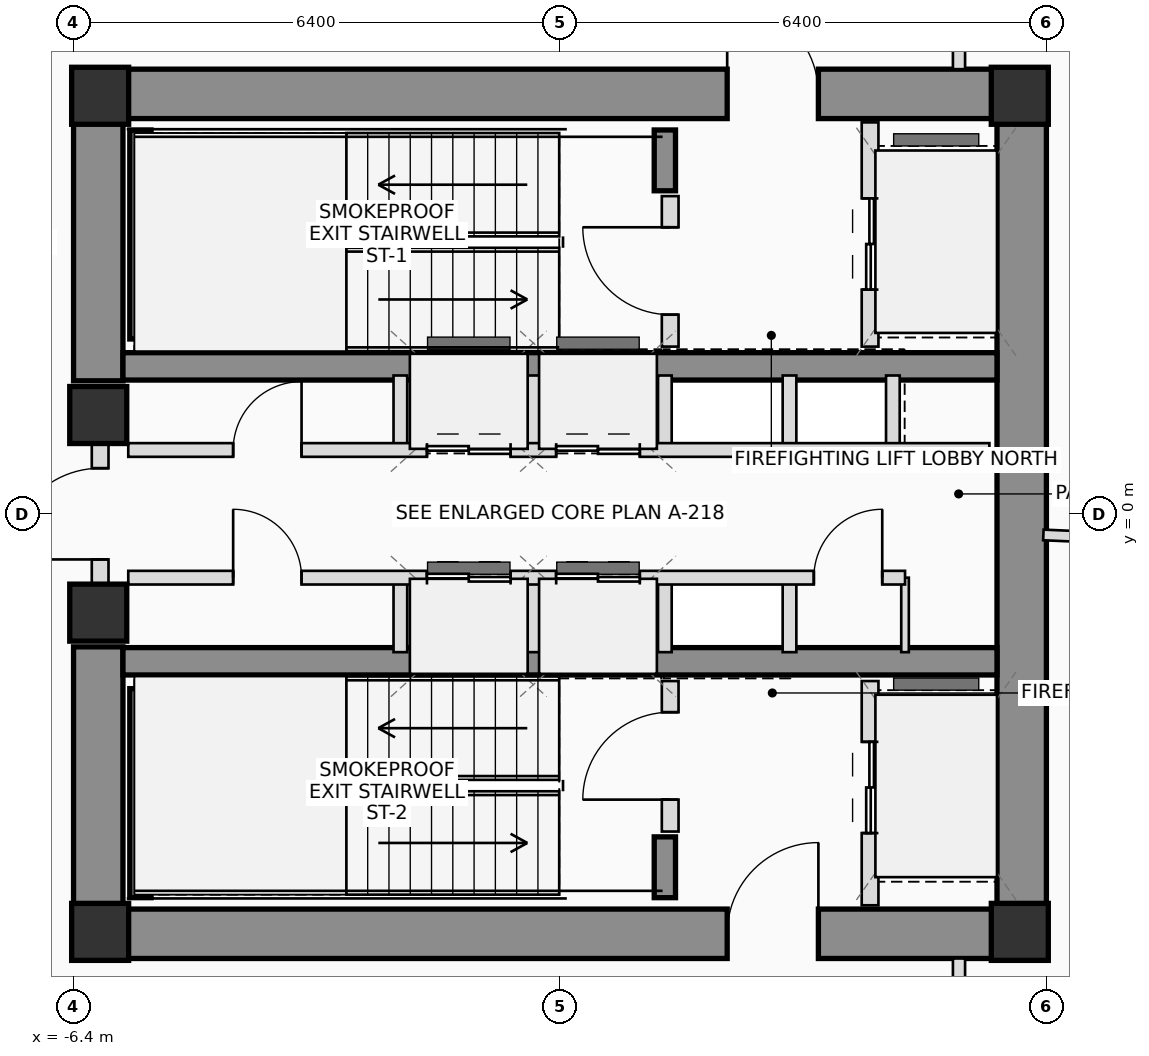
"""IFC4 building model, lengths in metres.
Left out: names, types, materials, properties, quantities, classifications, styles, units other than length and angle.
Written with IfcOpenShell. Run it as: python <this file> out.ifc"""

import sys

from ifc_helpers import new_model, si_unit, direction, frame, frame_2d, origin, origin_2d, place, context, subcontext, project, spatial, rectangle, extrude, source, transform, mapped, element, fill, save


model = new_model("IFC4")
c1 = context("Model", 3, precision=1e-05, world=origin(), true_north=direction((0.0, 1.0)))
c2 = subcontext(c1, "Body", "Model", "MODEL_VIEW")
j1 = project(units=[si_unit("LENGTHUNIT", "METRE"), si_unit("PLANEANGLEUNIT", "RADIAN")], contexts=[c1])
p1 = place(None, origin())
s1 = spatial("IfcSite", under=j1, at=p1, CompositionType="ELEMENT")
p2 = place(p1, origin())
s2 = spatial("IfcBuilding", under=s1, at=p2, CompositionType="ELEMENT")
p3 = place(p2, frame((0.0, 0.0, 198.35)))
s3 = spatial("IfcBuildingStorey", under=s2, at=p3, CompositionType="ELEMENT", Elevation=198.35)
m1 = source(origin(), c2, "Body", "SweptSolid", [
    extrude(rectangle(XDim=0.75, YDim=0.75, at=origin_2d()), origin(), (0.0, 0.0, 1.0), 3.45),
])
for number, where, z_axis, x_axis in (
    (1, (-6.05, -5.5, 0.0), (0.0, 0.0, 1.0), (1.0, 0.0, 0.0)),
    (2, (6.05, -5.5, 0.0), (0.0, 0.0, 1.0), (1.0, 0.0, 0.0)),
    (3, (6.05, 5.5, 0.0), (0.0, 0.0, 1.0), (1.0, 0.0, 0.0)),
    (4, (-6.05, 5.5, 0.0), (0.0, 0.0, 1.0), (1.0, 0.0, 0.0)),
):
    element("IfcColumn", number, at=place(p3, frame(where, z_axis=z_axis, x_axis=x_axis)), inside=s3, PredefinedType="COLUMN", context=c2, shape_type="MappedRepresentation", body=[
        mapped(m1, transform((0.0, 0.0, 0.0), scale=1.0)),
    ])
p4 = place(p3, frame((-6.4, 5.525, 0.0), z_axis=(0.0, 0.0, 1.0), x_axis=(1.0, 0.0, 0.0)))
e5 = element("IfcWall", 5, at=p4, inside=s3, PredefinedType="SHEAR", context=c2, shape_type="SweptSolid", body=[
    extrude(rectangle(XDim=12.8, YDim=0.65, at=frame_2d((6.4, 0.0))), origin(), (0.0, 0.0, 1.0), 3.45),
])
p5 = place(p4, frame((8.6, 0.0, 0.0)))
e6 = element("IfcOpeningElement", 6, at=p5, cuts=e5, PredefinedType="OPENING", context=c2, shape_type="SweptSolid", body=[
    extrude(rectangle(XDim=1.2, YDim=2.2, at=frame_2d((0.6, 1.1))), frame((0.0, 0.335, 0.0), z_axis=(0.0, -1.0, 0.0), x_axis=(1.0, 0.0, 0.0)), (0.0, 0.0, 1.0), 0.67),
])
p6 = place(p3, frame((-6.4, -5.525, 0.0), z_axis=(0.0, 0.0, 1.0), x_axis=(1.0, 0.0, 0.0)))
e7 = element("IfcWall", 7, at=p6, inside=s3, PredefinedType="SHEAR", context=c2, shape_type="SweptSolid", body=[
    extrude(rectangle(XDim=12.8, YDim=0.65, at=frame_2d((6.4, 0.0))), origin(), (0.0, 0.0, 1.0), 3.45),
])
p7 = place(p6, frame((8.6, 0.0, 0.0)))
e8 = element("IfcOpeningElement", 8, at=p7, cuts=e7, PredefinedType="OPENING", context=c2, shape_type="SweptSolid", body=[
    extrude(rectangle(XDim=1.2, YDim=2.2, at=frame_2d((0.6, 1.1))), frame((0.0, 0.335, 0.0), z_axis=(0.0, -1.0, 0.0), x_axis=(1.0, 0.0, 0.0)), (0.0, 0.0, 1.0), 0.67),
])
p8 = place(p3, frame((6.075, -5.2, 0.0), z_axis=(0.0, 0.0, 1.0), x_axis=(0.0, 1.0, 0.0)))
e9 = element("IfcWall", 9, at=p8, inside=s3, PredefinedType="SHEAR", context=c2, shape_type="SweptSolid", body=[
    extrude(rectangle(XDim=10.4, YDim=0.65, at=frame_2d((5.2, 0.0))), origin(), (0.0, 0.0, 1.0), 3.45),
])
for number, where, z_axis, x_axis in (
    (10, (-6.075, -5.2, 0.0), (0.0, 0.0, 1.0), (0.0, 1.0, 0.0)),
    (11, (-6.075, 1.75, 0.0), (0.0, 0.0, 1.0), (0.0, 1.0, 0.0)),
):
    element("IfcWall", number, at=place(p3, frame(where, z_axis=z_axis, x_axis=x_axis)), inside=s3, PredefinedType="SHEAR", context=c2, shape_type="SweptSolid", body=[
        extrude(rectangle(XDim=3.45, YDim=0.65, at=frame_2d((1.725, 0.0))), origin(), (0.0, 0.0, 1.0), 3.45),
    ])
for number, where, z_axis, x_axis in (
    (12, (-5.75, 1.94, 0.0), (0.0, 0.0, 1.0), (1.0, 0.0, 0.0)),
    (13, (-5.75, -1.94, 0.0), (0.0, 0.0, 1.0), (1.0, 0.0, 0.0)),
):
    element("IfcWall", number, at=place(p3, frame(where, z_axis=z_axis, x_axis=x_axis)), inside=s3, PredefinedType="SHEAR", context=c2, shape_type="SweptSolid", body=[
        extrude(rectangle(XDim=11.5, YDim=0.36, at=frame_2d((5.75, 0.0))), origin(), (0.0, 0.0, 1.0), 3.45),
    ])
p9 = place(p3, frame((-5.52, 2.3, 0.0), z_axis=(0.0, 0.0, 1.0), x_axis=(0.0, 1.0, 0.0)))
e14 = element("IfcWall", 14, at=p9, inside=s3, PredefinedType="SHEAR", context=c2, shape_type="SweptSolid", body=[
    extrude(rectangle(XDim=2.75, YDim=0.28, at=frame_2d((1.375, 0.0))), origin(), (0.0, 0.0, 1.0), 3.45),
])
p10 = place(p3, frame((1.38, 4.25, 0.0), z_axis=(0.0, 0.0, 1.0), x_axis=(0.0, 1.0, 0.0)))
e15 = element("IfcWall", 15, at=p10, inside=s3, PredefinedType="SHEAR", context=c2, shape_type="SweptSolid", body=[
    extrude(rectangle(XDim=0.8, YDim=0.28, at=frame_2d((0.4, 0.0))), origin(), (0.0, 0.0, 1.0), 3.45),
])
p11 = place(p3, frame((-5.52, -5.05, 0.0), z_axis=(0.0, 0.0, 1.0), x_axis=(0.0, 1.0, 0.0)))
e16 = element("IfcWall", 16, at=p11, inside=s3, PredefinedType="SHEAR", context=c2, shape_type="SweptSolid", body=[
    extrude(rectangle(XDim=2.75, YDim=0.28, at=frame_2d((1.375, 0.0))), origin(), (0.0, 0.0, 1.0), 3.45),
])
p12 = place(p3, frame((1.38, -5.05, 0.0), z_axis=(0.0, 0.0, 1.0), x_axis=(0.0, 1.0, 0.0)))
e17 = element("IfcWall", 17, at=p12, inside=s3, PredefinedType="SHEAR", context=c2, shape_type="SweptSolid", body=[
    extrude(rectangle(XDim=0.8, YDim=0.28, at=frame_2d((0.4, 0.0))), origin(), (0.0, 0.0, 1.0), 3.45),
])
for number, where, z_axis, x_axis in (
    (18, (-6.075, -1.3, 0.0), (0.0, 0.0, 1.0), (1.0, 0.0, 0.0)),
    (19, (-6.075, 1.3, 0.0), (0.0, 0.0, 1.0), (1.0, 0.0, 0.0)),
):
    element("IfcColumn", number, at=place(p3, frame(where, z_axis=z_axis, x_axis=x_axis)), inside=s3, PredefinedType="COLUMN", context=c2, shape_type="MappedRepresentation", body=[
        mapped(m1, transform((0.0, 0.0, 0.0), scale=1.0)),
    ])
p13 = place(p3, frame((-6.05, -0.95, 0.0), z_axis=(0.0, 0.0, 1.0), x_axis=(0.0, 1.0, 0.0)))
e20 = element("IfcWall", 20, at=p13, inside=s3, PredefinedType="PLUMBINGWALL", context=c2, shape_type="SweptSolid", body=[
    extrude(rectangle(XDim=1.9, YDim=0.22, at=frame_2d((0.95, 0.0))), origin(), (0.0, 0.0, 1.0), 2.23),
])
p14 = place(p13, frame((0.35, 0.0, 0.0)))
e21 = element("IfcOpeningElement", 21, at=p14, cuts=e20, PredefinedType="OPENING", context=c2, shape_type="SweptSolid", body=[
    extrude(rectangle(XDim=1.2, YDim=2.2, at=frame_2d((0.6, 1.1))), frame((0.0, 0.12, 0.0), z_axis=(0.0, -1.0, 0.0), x_axis=(1.0, 0.0, 0.0)), (0.0, 0.0, 1.0), 0.24),
])
p15 = place(p3, frame((1.45, 2.2, 0.0), z_axis=(0.0, 0.0, 1.0), x_axis=(0.0, 1.0, 0.0)))
e22 = element("IfcWall", 22, at=p15, inside=s3, PredefinedType="PLUMBINGWALL", context=c2, shape_type="SweptSolid", body=[
    extrude(rectangle(XDim=1.98, YDim=0.22, at=frame_2d((0.99, 0.0))), origin(), (0.0, 0.0, 1.0), 3.25),
])
p16 = place(p15, frame((0.42, 0.0, 0.0)))
e23 = element("IfcOpeningElement", 23, at=p16, cuts=e22, PredefinedType="OPENING", context=c2, shape_type="SweptSolid", body=[
    extrude(rectangle(XDim=1.15, YDim=2.15, at=frame_2d((0.575, 1.075))), frame((0.0, 0.12, 0.0), z_axis=(0.0, -1.0, 0.0), x_axis=(1.0, 0.0, 0.0)), (0.0, 0.0, 1.0), 0.24),
])
p17 = place(p3, frame((4.08, 2.2, 0.0), z_axis=(0.0, 0.0, 1.0), x_axis=(0.0, 1.0, 0.0)))
e24 = element("IfcWall", 24, at=p17, inside=s3, PredefinedType="PLUMBINGWALL", context=c2, shape_type="SweptSolid", body=[
    extrude(rectangle(XDim=2.95, YDim=0.22, at=frame_2d((1.475, 0.0))), origin(), (0.0, 0.0, 1.0), 3.25),
])
p18 = place(p17, frame((0.75, 0.0, 0.0)))
e25 = element("IfcOpeningElement", 25, at=p18, cuts=e24, PredefinedType="OPENING", context=c2, shape_type="SweptSolid", body=[
    extrude(rectangle(XDim=1.2, YDim=2.25, at=frame_2d((0.6, 1.125))), frame((0.0, 0.12, 0.0), z_axis=(0.0, -1.0, 0.0), x_axis=(1.0, 0.0, 0.0)), (0.0, 0.0, 1.0), 0.24),
])
p19 = place(p3, frame((1.45, -4.18, 0.0), z_axis=(0.0, 0.0, 1.0), x_axis=(0.0, 1.0, 0.0)))
e26 = element("IfcWall", 26, at=p19, inside=s3, PredefinedType="PLUMBINGWALL", context=c2, shape_type="SweptSolid", body=[
    extrude(rectangle(XDim=1.98, YDim=0.22, at=frame_2d((0.99, 0.0))), origin(), (0.0, 0.0, 1.0), 3.25),
])
p20 = place(p19, frame((0.42, 0.0, 0.0)))
e27 = element("IfcOpeningElement", 27, at=p20, cuts=e26, PredefinedType="OPENING", context=c2, shape_type="SweptSolid", body=[
    extrude(rectangle(XDim=1.15, YDim=2.15, at=frame_2d((0.575, 1.075))), frame((0.0, 0.12, 0.0), z_axis=(0.0, -1.0, 0.0), x_axis=(1.0, 0.0, 0.0)), (0.0, 0.0, 1.0), 0.24),
])
p21 = place(p3, frame((4.08, -5.15, 0.0), z_axis=(0.0, 0.0, 1.0), x_axis=(0.0, 1.0, 0.0)))
e28 = element("IfcWall", 28, at=p21, inside=s3, PredefinedType="PLUMBINGWALL", context=c2, shape_type="SweptSolid", body=[
    extrude(rectangle(XDim=2.95, YDim=0.22, at=frame_2d((1.475, 0.0))), origin(), (0.0, 0.0, 1.0), 3.25),
])
p22 = place(p21, frame((0.95, 0.0, 0.0)))
e29 = element("IfcOpeningElement", 29, at=p22, cuts=e28, PredefinedType="OPENING", context=c2, shape_type="SweptSolid", body=[
    extrude(rectangle(XDim=1.2, YDim=2.25, at=frame_2d((0.6, 1.125))), frame((0.0, 0.12, 0.0), z_axis=(0.0, -1.0, 0.0), x_axis=(1.0, 0.0, 0.0)), (0.0, 0.0, 1.0), 0.24),
])
for number, where, z_axis, x_axis in (
    (30, (-2.1, 0.84, 0.0), (0.0, 0.0, 1.0), (0.0, 1.0, 0.0)),
    (31, (-2.1, -1.82, 0.0), (0.0, 0.0, 1.0), (0.0, 1.0, 0.0)),
    (32, (-0.35, 0.84, 0.0), (0.0, 0.0, 1.0), (0.0, 1.0, 0.0)),
    (33, (-0.35, -1.82, 0.0), (0.0, 0.0, 1.0), (0.0, 1.0, 0.0)),
    (34, (1.38, 0.84, 0.0), (0.0, 0.0, 1.0), (0.0, 1.0, 0.0)),
    (35, (1.38, -1.82, 0.0), (0.0, 0.0, 1.0), (0.0, 1.0, 0.0)),
    (36, (3.02, 0.84, 0.0), (0.0, 0.0, 1.0), (0.0, 1.0, 0.0)),
    (37, (4.38, 0.84, 0.0), (0.0, 0.0, 1.0), (0.0, 1.0, 0.0)),
    (38, (3.02, -1.82, 0.0), (0.0, 0.0, 1.0), (0.0, 1.0, 0.0)),
):
    element("IfcWall", number, at=place(p3, frame(where, z_axis=z_axis, x_axis=x_axis)), inside=s3, PredefinedType="PLUMBINGWALL", context=c2, shape_type="SweptSolid", body=[
        extrude(rectangle(XDim=0.98, YDim=0.18, at=frame_2d((0.49, 0.0))), origin(), (0.0, 0.0, 1.0), 3.25),
    ])
p23 = place(p3, frame((4.54, -1.82, 0.0), z_axis=(0.0, 0.0, 1.0), x_axis=(0.0, 1.0, 0.0)))
e39 = element("IfcWall", 39, at=p23, inside=s3, PredefinedType="PARTITIONING", context=c2, shape_type="SweptSolid", body=[
    extrude(rectangle(XDim=0.98, YDim=0.1, at=frame_2d((0.49, 0.0))), origin(), (0.0, 0.0, 1.0), 3.25),
])
p24 = place(p3, frame((-5.68, 0.84, 0.0), z_axis=(0.0, 0.0, 1.0), x_axis=(1.0, 0.0, 0.0)))
e40 = element("IfcWall", 40, at=p24, inside=s3, PredefinedType="PLUMBINGWALL", context=c2, shape_type="SweptSolid", body=[
    extrude(rectangle(XDim=11.33, YDim=0.18, at=frame_2d((5.665, 0.0))), origin(), (0.0, 0.0, 1.0), 3.25),
])
p25 = place(p24, frame((1.38, 0.0, 0.0)))
e41 = element("IfcOpeningElement", 41, at=p25, cuts=e40, PredefinedType="OPENING", context=c2, shape_type="SweptSolid", body=[
    extrude(rectangle(XDim=0.9, YDim=2.05, at=frame_2d((0.45, 1.025))), frame((0.0, 0.1, 0.0), z_axis=(0.0, -1.0, 0.0), x_axis=(1.0, 0.0, 0.0)), (0.0, 0.0, 1.0), 0.2),
])
p26 = place(p24, frame((3.93, 0.0, 0.0)))
e42 = element("IfcOpeningElement", 42, at=p26, cuts=e40, PredefinedType="OPENING", context=c2, shape_type="SweptSolid", body=[
    extrude(rectangle(XDim=1.1, YDim=2.2, at=frame_2d((0.55, 1.1))), frame((0.0, 0.1, 0.0), z_axis=(0.0, -1.0, 0.0), x_axis=(1.0, 0.0, 0.0)), (0.0, 0.0, 1.0), 0.2),
])
p27 = place(p24, frame((5.63, 0.0, 0.0)))
e43 = element("IfcOpeningElement", 43, at=p27, cuts=e40, PredefinedType="OPENING", context=c2, shape_type="SweptSolid", body=[
    extrude(rectangle(XDim=1.1, YDim=2.2, at=frame_2d((0.55, 1.1))), frame((0.0, 0.1, 0.0), z_axis=(0.0, -1.0, 0.0), x_axis=(1.0, 0.0, 0.0)), (0.0, 0.0, 1.0), 0.2),
])
p28 = place(p3, frame((-5.68, -0.84, 0.0), z_axis=(0.0, 0.0, 1.0), x_axis=(1.0, 0.0, 0.0)))
e44 = element("IfcWall", 44, at=p28, inside=s3, PredefinedType="PLUMBINGWALL", context=c2, shape_type="SweptSolid", body=[
    extrude(rectangle(XDim=10.22, YDim=0.18, at=frame_2d((5.11, 0.0))), origin(), (0.0, 0.0, 1.0), 3.25),
])
p29 = place(p28, frame((1.38, 0.0, 0.0)))
e45 = element("IfcOpeningElement", 45, at=p29, cuts=e44, PredefinedType="OPENING", context=c2, shape_type="SweptSolid", body=[
    extrude(rectangle(XDim=0.9, YDim=2.05, at=frame_2d((0.45, 1.025))), frame((0.0, 0.1, 0.0), z_axis=(0.0, -1.0, 0.0), x_axis=(1.0, 0.0, 0.0)), (0.0, 0.0, 1.0), 0.2),
])
p30 = place(p28, frame((3.93, 0.0, 0.0)))
e46 = element("IfcOpeningElement", 46, at=p30, cuts=e44, PredefinedType="OPENING", context=c2, shape_type="SweptSolid", body=[
    extrude(rectangle(XDim=1.1, YDim=2.2, at=frame_2d((0.55, 1.1))), frame((0.0, 0.1, 0.0), z_axis=(0.0, -1.0, 0.0), x_axis=(1.0, 0.0, 0.0)), (0.0, 0.0, 1.0), 0.2),
])
p31 = place(p28, frame((5.63, 0.0, 0.0)))
e47 = element("IfcOpeningElement", 47, at=p31, cuts=e44, PredefinedType="OPENING", context=c2, shape_type="SweptSolid", body=[
    extrude(rectangle(XDim=1.1, YDim=2.2, at=frame_2d((0.55, 1.1))), frame((0.0, 0.1, 0.0), z_axis=(0.0, -1.0, 0.0), x_axis=(1.0, 0.0, 0.0)), (0.0, 0.0, 1.0), 0.2),
])
p32 = place(p28, frame((9.02, 0.0, 0.0)))
e48 = element("IfcOpeningElement", 48, at=p32, cuts=e44, PredefinedType="OPENING", context=c2, shape_type="SweptSolid", body=[
    extrude(rectangle(XDim=0.9, YDim=2.05, at=frame_2d((0.45, 1.025))), frame((0.0, 0.1, 0.0), z_axis=(0.0, -1.0, 0.0), x_axis=(1.0, 0.0, 0.0)), (0.0, 0.0, 1.0), 0.2),
])
p33 = place(p3, frame((5.25, 7.5, 0.0), z_axis=(0.0, 0.0, 1.0), x_axis=(0.0, -1.0, 0.0)))
e49 = element("IfcWall", 49, at=p33, inside=s3, PredefinedType="PARTITIONING", context=c2, shape_type="SweptSolid", body=[
    extrude(rectangle(XDim=1.65, YDim=0.16, at=frame_2d((0.825, 0.0))), origin(), (0.0, 0.0, 1.0), 2.605),
])
p34 = place(p3, frame((5.25, -5.85, 0.0), z_axis=(0.0, 0.0, 1.0), x_axis=(0.0, -1.0, 0.0)))
e50 = element("IfcWall", 50, at=p34, inside=s3, PredefinedType="PARTITIONING", context=c2, shape_type="SweptSolid", body=[
    extrude(rectangle(XDim=1.65, YDim=0.16, at=frame_2d((0.825, 0.0))), origin(), (0.0, 0.0, 1.0), 3.25),
])
p35 = place(p3, frame((6.36, -0.278, 0.0), z_axis=(0.0, 0.0, 1.0), x_axis=(0.999047276506, -0.04364102778, 0.0)))
e51 = element("IfcWall", 51, at=p35, inside=s3, PredefinedType="PARTITIONING", context=c2, shape_type="SweptSolid", body=[
    extrude(rectangle(XDim=7.642, YDim=0.14, at=frame_2d((3.821, 0.0))), origin(), (0.0, 0.0, 1.0), 2.605),
])
p36 = place(p5, origin())
e52 = element("IfcDoor", 52, at=p36, inside=s3, OperationType="SINGLE_SWING_LEFT", PredefinedType="DOOR", context=c2, shape_type="SweptSolid", body=[
    extrude(rectangle(XDim=1.2, YDim=2.2, at=frame_2d((0.6, 1.1))), frame((0.0, 0.025, 0.0), z_axis=(0.0, -1.0, 0.0), x_axis=(1.0, 0.0, 0.0)), (0.0, 0.0, 1.0), 0.05),
])
fill(e6, e52)
p37 = place(p7, origin())
e53 = element("IfcDoor", 53, at=p37, inside=s3, OperationType="SINGLE_SWING_RIGHT", PredefinedType="DOOR", context=c2, shape_type="SweptSolid", body=[
    extrude(rectangle(XDim=1.2, YDim=2.2, at=frame_2d((0.6, 1.1))), frame((0.0, 0.025, 0.0), z_axis=(0.0, -1.0, 0.0), x_axis=(1.0, 0.0, 0.0)), (0.0, 0.0, 1.0), 0.05),
])
fill(e8, e53)
p38 = place(p14, origin())
e54 = element("IfcDoor", 54, at=p38, inside=s3, OperationType="SINGLE_SWING_LEFT", PredefinedType="DOOR", context=c2, shape_type="SweptSolid", body=[
    extrude(rectangle(XDim=1.2, YDim=2.2, at=frame_2d((0.6, 1.1))), frame((0.0, 0.025, 0.0), z_axis=(0.0, -1.0, 0.0), x_axis=(1.0, 0.0, 0.0)), (0.0, 0.0, 1.0), 0.05),
])
fill(e21, e54)
p39 = place(p16, origin())
e55 = element("IfcDoor", 55, at=p39, inside=s3, OperationType="SINGLE_SWING_RIGHT", PredefinedType="DOOR", context=c2, shape_type="SweptSolid", body=[
    extrude(rectangle(XDim=1.15, YDim=2.15, at=frame_2d((0.575, 1.075))), frame((0.0, 0.025, 0.0), z_axis=(0.0, -1.0, 0.0), x_axis=(1.0, 0.0, 0.0)), (0.0, 0.0, 1.0), 0.05),
])
fill(e23, e55)
p40 = place(p18, origin())
e56 = element("IfcDoor", 56, at=p40, inside=s3, OperationType="DOUBLE_DOOR_SLIDING", PredefinedType="DOOR", context=c2, shape_type="SweptSolid", body=[
    extrude(rectangle(XDim=1.2, YDim=2.25, at=frame_2d((0.6, 1.125))), frame((0.0, 0.025, 0.0), z_axis=(0.0, -1.0, 0.0), x_axis=(1.0, 0.0, 0.0)), (0.0, 0.0, 1.0), 0.05),
])
fill(e25, e56)
p41 = place(p20, origin())
e57 = element("IfcDoor", 57, at=p41, inside=s3, OperationType="SINGLE_SWING_LEFT", PredefinedType="DOOR", context=c2, shape_type="SweptSolid", body=[
    extrude(rectangle(XDim=1.15, YDim=2.15, at=frame_2d((0.575, 1.075))), frame((0.0, 0.025, 0.0), z_axis=(0.0, -1.0, 0.0), x_axis=(1.0, 0.0, 0.0)), (0.0, 0.0, 1.0), 0.05),
])
fill(e27, e57)
p42 = place(p22, origin())
e58 = element("IfcDoor", 58, at=p42, inside=s3, OperationType="DOUBLE_DOOR_SLIDING", PredefinedType="DOOR", context=c2, shape_type="SweptSolid", body=[
    extrude(rectangle(XDim=1.2, YDim=2.25, at=frame_2d((0.6, 1.125))), frame((0.0, 0.025, 0.0), z_axis=(0.0, -1.0, 0.0), x_axis=(1.0, 0.0, 0.0)), (0.0, 0.0, 1.0), 0.05),
])
fill(e29, e58)
p43 = place(p25, origin())
e59 = element("IfcDoor", 59, at=p43, inside=s3, OperationType="SINGLE_SWING_RIGHT", PredefinedType="DOOR", context=c2, shape_type="SweptSolid", body=[
    extrude(rectangle(XDim=0.9, YDim=2.05, at=frame_2d((0.45, 1.025))), frame((0.0, 0.025, 0.0), z_axis=(0.0, -1.0, 0.0), x_axis=(1.0, 0.0, 0.0)), (0.0, 0.0, 1.0), 0.05),
])
fill(e41, e59)
p44 = place(p26, origin())
e60 = element("IfcDoor", 60, at=p44, inside=s3, OperationType="DOUBLE_DOOR_SLIDING", PredefinedType="DOOR", context=c2, shape_type="SweptSolid", body=[
    extrude(rectangle(XDim=1.1, YDim=2.2, at=frame_2d((0.55, 1.1))), frame((0.0, 0.025, 0.0), z_axis=(0.0, -1.0, 0.0), x_axis=(1.0, 0.0, 0.0)), (0.0, 0.0, 1.0), 0.05),
])
fill(e42, e60)
p45 = place(p27, origin())
e61 = element("IfcDoor", 61, at=p45, inside=s3, OperationType="DOUBLE_DOOR_SLIDING", PredefinedType="DOOR", context=c2, shape_type="SweptSolid", body=[
    extrude(rectangle(XDim=1.1, YDim=2.2, at=frame_2d((0.55, 1.1))), frame((0.0, 0.025, 0.0), z_axis=(0.0, -1.0, 0.0), x_axis=(1.0, 0.0, 0.0)), (0.0, 0.0, 1.0), 0.05),
])
fill(e43, e61)
p46 = place(p29, origin())
e62 = element("IfcDoor", 62, at=p46, inside=s3, OperationType="SINGLE_SWING_LEFT", PredefinedType="DOOR", context=c2, shape_type="SweptSolid", body=[
    extrude(rectangle(XDim=0.9, YDim=2.05, at=frame_2d((0.45, 1.025))), frame((0.0, 0.025, 0.0), z_axis=(0.0, -1.0, 0.0), x_axis=(1.0, 0.0, 0.0)), (0.0, 0.0, 1.0), 0.05),
])
fill(e45, e62)
p47 = place(p30, origin())
e63 = element("IfcDoor", 63, at=p47, inside=s3, OperationType="DOUBLE_DOOR_SLIDING", PredefinedType="DOOR", context=c2, shape_type="SweptSolid", body=[
    extrude(rectangle(XDim=1.1, YDim=2.2, at=frame_2d((0.55, 1.1))), frame((0.0, 0.025, 0.0), z_axis=(0.0, -1.0, 0.0), x_axis=(1.0, 0.0, 0.0)), (0.0, 0.0, 1.0), 0.05),
])
fill(e46, e63)
p48 = place(p31, origin())
e64 = element("IfcDoor", 64, at=p48, inside=s3, OperationType="DOUBLE_DOOR_SLIDING", PredefinedType="DOOR", context=c2, shape_type="SweptSolid", body=[
    extrude(rectangle(XDim=1.1, YDim=2.2, at=frame_2d((0.55, 1.1))), frame((0.0, 0.025, 0.0), z_axis=(0.0, -1.0, 0.0), x_axis=(1.0, 0.0, 0.0)), (0.0, 0.0, 1.0), 0.05),
])
fill(e47, e64)
p49 = place(p32, origin())
e65 = element("IfcDoor", 65, at=p49, inside=s3, OperationType="SINGLE_SWING_RIGHT", PredefinedType="DOOR", context=c2, shape_type="SweptSolid", body=[
    extrude(rectangle(XDim=0.9, YDim=2.05, at=frame_2d((0.45, 1.025))), frame((0.0, 0.025, 0.0), z_axis=(0.0, -1.0, 0.0), x_axis=(1.0, 0.0, 0.0)), (0.0, 0.0, 1.0), 0.05),
])
fill(e48, e65)
save(model, sys.argv[1])
